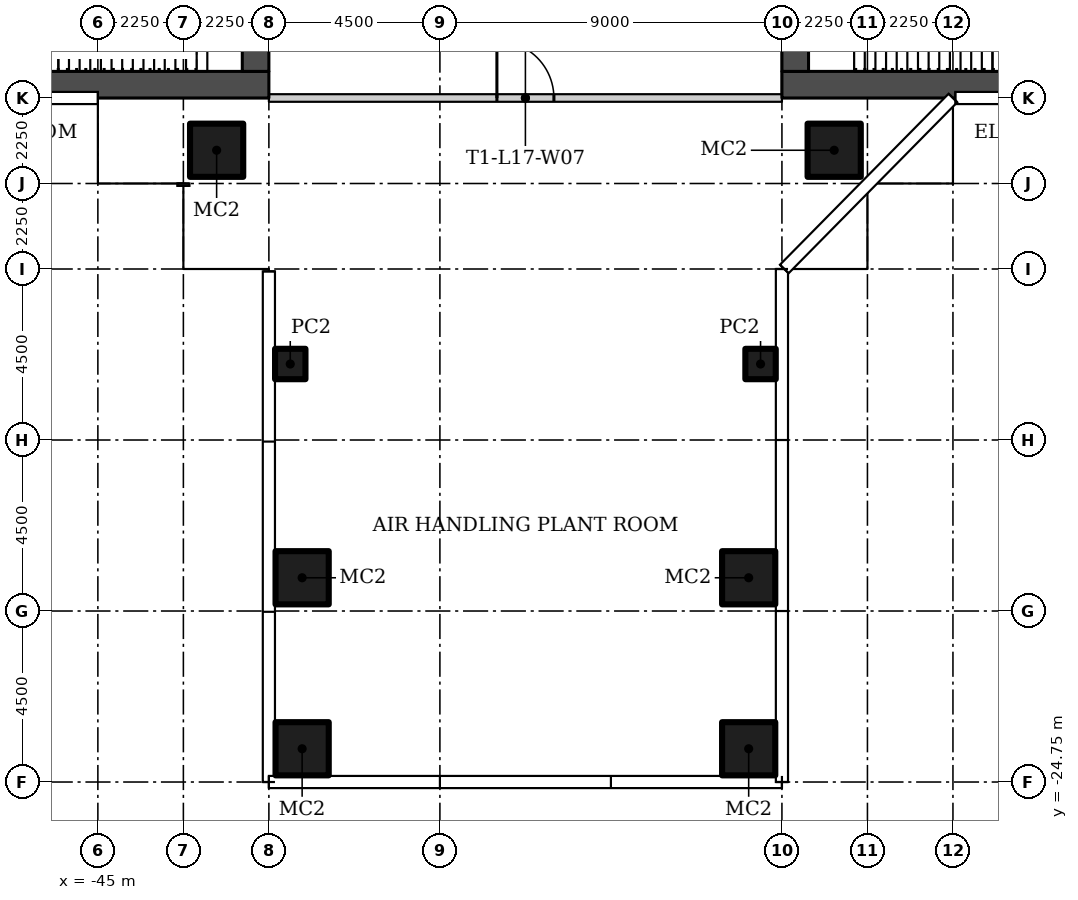
"""IFC4 building model, lengths in metres.
Left out: names, types, materials, properties, quantities, classifications, styles, units other than length and angle.
Written with IfcOpenShell. Run it as: python <this file> out.ifc"""

import sys

from ifc_helpers import new_model, si_unit, direction, frame, frame_2d, origin, origin_2d, place, context, subcontext, project, spatial, rectangle, hollow_rectangle, extrude, element, fill, save


model = new_model("IFC4")
c1 = context("Model", 3, precision=1e-05, world=origin(), true_north=direction((0.0, 1.0)))
c2 = subcontext(c1, "Body", "Model", "MODEL_VIEW")
j1 = project(units=[si_unit("LENGTHUNIT", "METRE"), si_unit("PLANEANGLEUNIT", "RADIAN")], contexts=[c1])
p1 = place(None, origin())
s1 = spatial("IfcSite", under=j1, at=p1, CompositionType="ELEMENT")
p2 = place(p1, origin())
s2 = spatial("IfcBuilding", under=s1, at=p2, CompositionType="ELEMENT")
p3 = place(p2, frame((0.0, 0.0, 77.1)))
s3 = spatial("IfcBuildingStorey", under=s2, at=p3, CompositionType="ELEMENT", Elevation=77.1)
for number, where in (
    (1, (-25.625, -8.125, 0.0)),
    (2, (-41.875, -8.125, 0.0)),
):
    element("IfcColumn", number, at=place(p3, frame(where)), inside=s3, PredefinedType="COLUMN", context=c2, shape_type="SweptSolid", body=[
        extrude(hollow_rectangle(XDim=1.4, YDim=1.4, WallThickness=0.05, at=origin_2d()), origin(), (0.0, 0.0, 1.0), 4.45),
    ])
p4 = place(p3, frame((-39.938, -13.75, 0.0)))
e3 = element("IfcColumn", 3, at=p4, inside=s3, PredefinedType="COLUMN", context=c2, shape_type="SweptSolid", body=[
    extrude(hollow_rectangle(XDim=0.8, YDim=0.8, WallThickness=0.025, at=origin_2d()), origin(), (0.0, 0.0, 1.0), 4.45),
])
for number, where in (
    (4, (-39.625, -19.375, 0.0)),
    (5, (-39.625, -23.875, 0.0)),
):
    element("IfcColumn", number, at=place(p3, frame(where)), inside=s3, PredefinedType="COLUMN", context=c2, shape_type="SweptSolid", body=[
        extrude(hollow_rectangle(XDim=1.4, YDim=1.4, WallThickness=0.05, at=origin_2d()), origin(), (0.0, 0.0, 1.0), 4.45),
    ])
p5 = place(p3, frame((-27.562, -13.75, 0.0)))
e6 = element("IfcColumn", 6, at=p5, inside=s3, PredefinedType="COLUMN", context=c2, shape_type="SweptSolid", body=[
    extrude(hollow_rectangle(XDim=0.8, YDim=0.8, WallThickness=0.025, at=origin_2d()), origin(), (0.0, 0.0, 1.0), 4.45),
])
for number, where in (
    (7, (-27.875, -19.375, 0.0)),
    (8, (-27.875, -23.875, 0.0)),
):
    element("IfcColumn", number, at=place(p3, frame(where)), inside=s3, PredefinedType="COLUMN", context=c2, shape_type="SweptSolid", body=[
        extrude(hollow_rectangle(XDim=1.4, YDim=1.4, WallThickness=0.05, at=origin_2d()), origin(), (0.0, 0.0, 1.0), 4.45),
    ])
p6 = place(p3, frame((-40.5, -6.75, 0.0)))
e9 = element("IfcWall", 9, at=p6, inside=s3, PredefinedType="PARTITIONING", context=c2, shape_type="SweptSolid", body=[
    extrude(rectangle(XDim=13.5, YDim=0.2, at=frame_2d((6.75, 0.0))), origin(), (0.0, 0.0, 1.0), 4.45),
])
p7 = place(p6, frame((6.0, 0.0, 0.0)))
e10 = element("IfcOpeningElement", 10, at=p7, cuts=e9, PredefinedType="OPENING", context=c2, shape_type="SweptSolid", body=[
    extrude(rectangle(XDim=1.5, YDim=2.4, at=frame_2d((0.75, 1.2))), frame((0.0, 0.11, 0.0), z_axis=(0.0, -1.0, 0.0), x_axis=(1.0, 0.0, 0.0)), (0.0, 0.0, 1.0), 0.22),
])
p8 = place(p3, frame((-27.0, -6.4, 0.0)))
e11 = element("IfcWall", 11, at=p8, inside=s3, PredefinedType="SHEAR", context=c2, shape_type="SweptSolid", body=[
    extrude(rectangle(XDim=13.5, YDim=0.7, at=frame_2d((6.75, 0.0))), origin(), (0.0, 0.0, 1.0), 4.45),
])
p9 = place(p3, frame((-26.65, 6.05, 0.0), z_axis=(0.0, 0.0, 1.0), x_axis=(0.0, -1.0, 0.0)))
e12 = element("IfcWall", 12, at=p9, inside=s3, PredefinedType="SHEAR", context=c2, shape_type="SweptSolid", body=[
    extrude(rectangle(XDim=12.1, YDim=0.7, at=frame_2d((6.05, 0.0))), origin(), (0.0, 0.0, 1.0), 4.45),
])
p10 = place(p9, frame((7.45, 0.0, 0.0)))
e13 = element("IfcOpeningElement", 13, at=p10, cuts=e12, PredefinedType="OPENING", context=c2, shape_type="SweptSolid", body=[
    extrude(rectangle(XDim=1.2, YDim=2.1, at=frame_2d((0.6, 1.05))), frame((0.0, 0.36, 0.0), z_axis=(0.0, -1.0, 0.0), x_axis=(1.0, 0.0, 0.0)), (0.0, 0.0, 1.0), 0.72),
])
p11 = place(p9, frame((3.9, 0.0, 0.0)))
e14 = element("IfcOpeningElement", 14, at=p11, cuts=e12, PredefinedType="OPENING", context=c2, shape_type="SweptSolid", body=[
    extrude(rectangle(XDim=1.8, YDim=2.4, at=frame_2d((0.9, 1.2))), frame((0.0, 0.36, 0.0), z_axis=(0.0, -1.0, 0.0), x_axis=(1.0, 0.0, 0.0)), (0.0, 0.0, 1.0), 0.72),
])
p12 = place(p3, frame((-40.5, -6.4, 0.0), z_axis=(0.0, 0.0, 1.0), x_axis=(-1.0, 0.0, 0.0)))
e15 = element("IfcWall", 15, at=p12, inside=s3, PredefinedType="SHEAR", context=c2, shape_type="SweptSolid", body=[
    extrude(rectangle(XDim=13.5, YDim=0.7, at=frame_2d((6.75, 0.0))), origin(), (0.0, 0.0, 1.0), 4.45),
])
p13 = place(p3, frame((-40.85, -6.05, 0.0), z_axis=(0.0, 0.0, 1.0), x_axis=(0.0, 1.0, 0.0)))
e16 = element("IfcWall", 16, at=p13, inside=s3, PredefinedType="SHEAR", context=c2, shape_type="SweptSolid", body=[
    extrude(rectangle(XDim=12.1, YDim=0.7, at=frame_2d((6.05, 0.0))), origin(), (0.0, 0.0, 1.0), 4.45),
])
p14 = place(p13, frame((3.45, 0.0, 0.0)))
e17 = element("IfcOpeningElement", 17, at=p14, cuts=e16, PredefinedType="OPENING", context=c2, shape_type="SweptSolid", body=[
    extrude(rectangle(XDim=1.2, YDim=2.1, at=frame_2d((0.6, 1.05))), frame((0.0, 0.36, 0.0), z_axis=(0.0, -1.0, 0.0), x_axis=(1.0, 0.0, 0.0)), (0.0, 0.0, 1.0), 0.72),
])
p15 = place(p13, frame((6.4, 0.0, 0.0)))
e18 = element("IfcOpeningElement", 18, at=p15, cuts=e16, PredefinedType="OPENING", context=c2, shape_type="SweptSolid", body=[
    extrude(rectangle(XDim=1.8, YDim=2.4, at=frame_2d((0.9, 1.2))), frame((0.0, 0.36, 0.0), z_axis=(0.0, -1.0, 0.0), x_axis=(1.0, 0.0, 0.0)), (0.0, 0.0, 1.0), 0.72),
])
p16 = place(p7, origin())
e19 = element("IfcDoor", 19, at=p16, inside=s3, OperationType="DOUBLE_DOOR_SINGLE_SWING", PredefinedType="DOOR", context=c2, shape_type="SweptSolid", body=[
    extrude(rectangle(XDim=1.5, YDim=2.4, at=frame_2d((0.75, 1.2))), frame((0.0, 0.025, 0.0), z_axis=(0.0, -1.0, 0.0), x_axis=(1.0, 0.0, 0.0)), (0.0, 0.0, 1.0), 0.05),
])
fill(e10, e19)
save(model, sys.argv[1])
